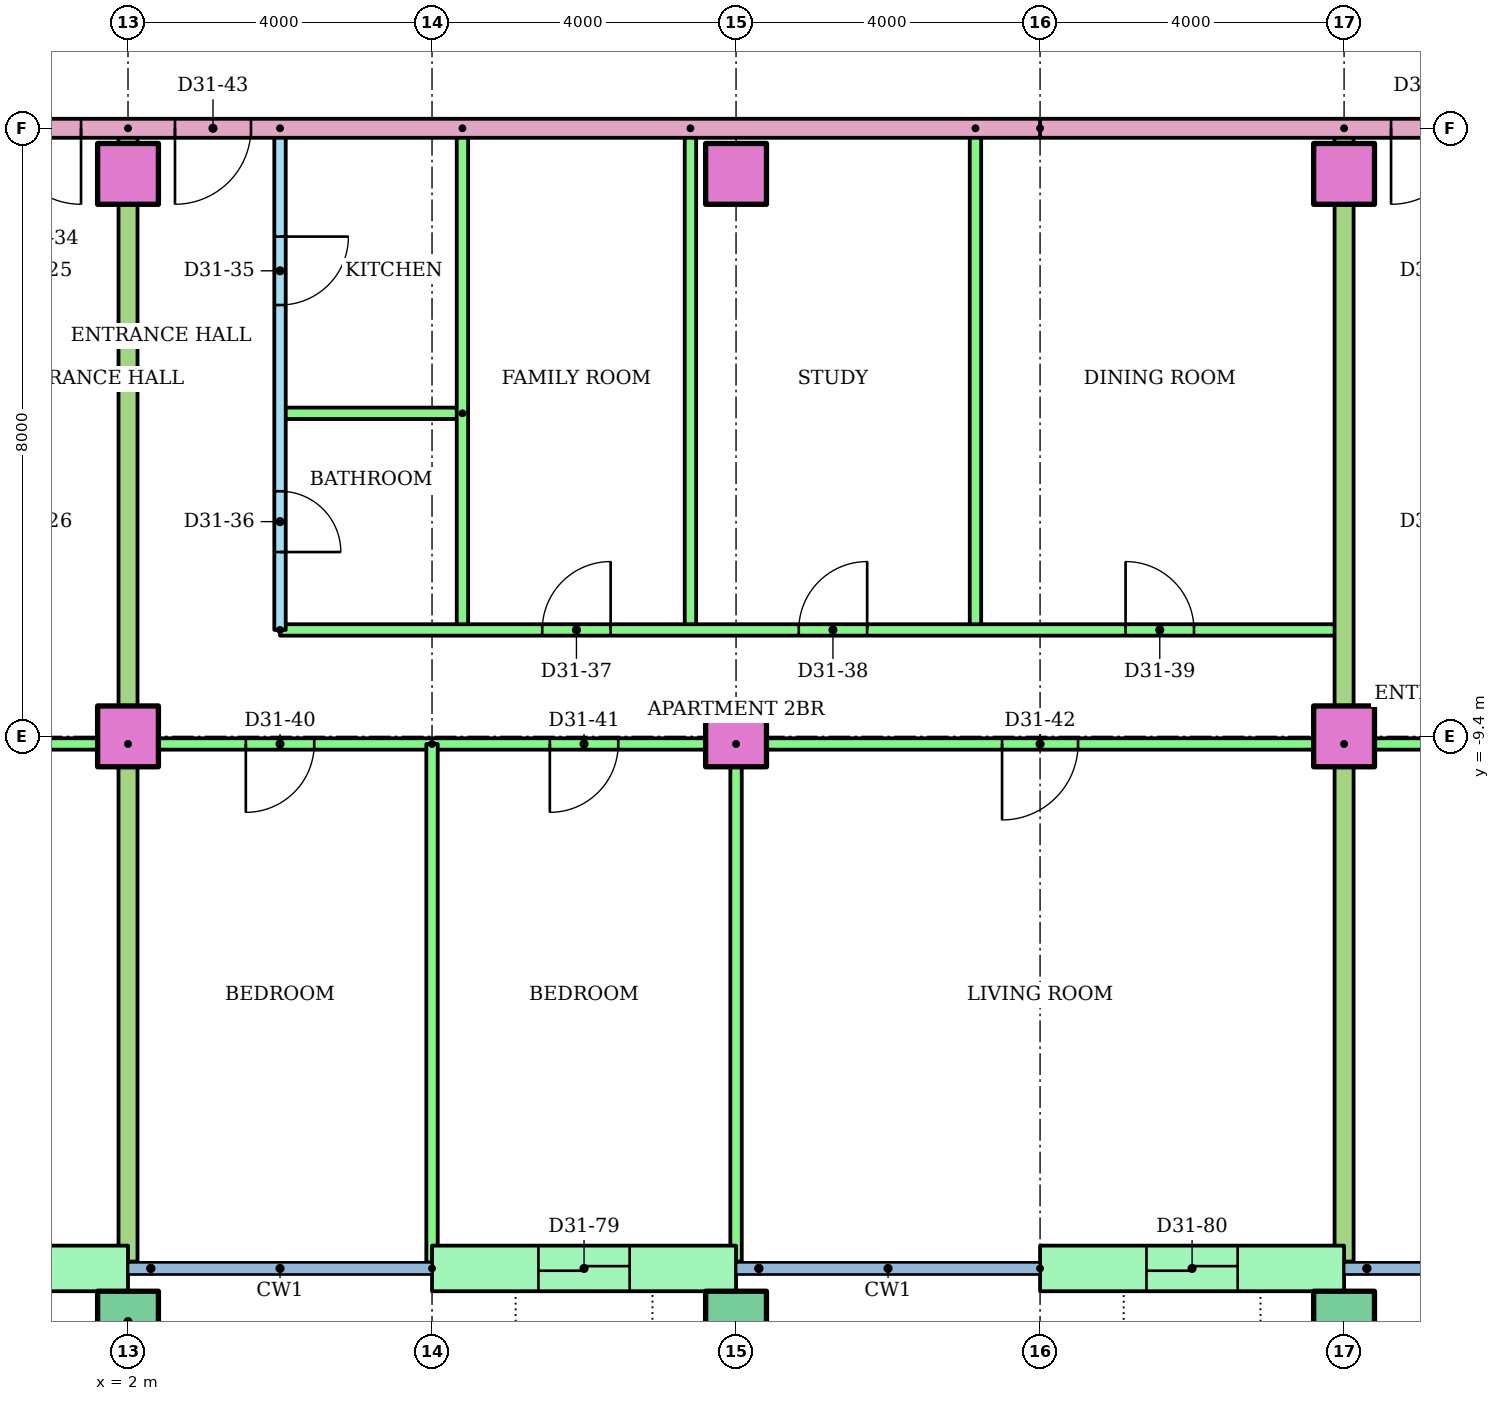
"""IFC4 building model, lengths in metres.
Left out: names, types, materials, properties, quantities, classifications, styles, units other than length and angle.
Written with IfcOpenShell. Run it as: python <this file> out.ifc"""

import sys

from ifc_helpers import new_model, si_unit, direction, frame, frame_2d, origin, origin_2d, place, context, subcontext, project, spatial, rectangle, hollow_rectangle, extrude, element, fill, save


model = new_model("IFC4")
c1 = context("Model", 3, precision=1e-05, world=origin(), true_north=direction((0.0, 1.0)))
c2 = subcontext(c1, "Body", "Model", "MODEL_VIEW")
j1 = project(units=[si_unit("LENGTHUNIT", "METRE"), si_unit("PLANEANGLEUNIT", "RADIAN")], contexts=[c1])
p1 = place(None, origin())
s1 = spatial("IfcSite", under=j1, at=p1, CompositionType="ELEMENT")
p2 = place(p1, origin())
s2 = spatial("IfcBuilding", under=s1, at=p2, CompositionType="ELEMENT")
p3 = place(p2, frame((0.0, 0.0, 123.0)))
s3 = spatial("IfcBuildingStorey", under=s2, at=p3, CompositionType="ELEMENT", Elevation=123.0)
for number, where in (
    (1, (2.0, -17.1, 0.0)),
    (2, (10.0, -17.1, 0.0)),
    (3, (18.0, -17.1, 0.0)),
):
    element("IfcColumn", number, at=place(p3, frame(where)), inside=s3, PredefinedType="COLUMN", context=c2, shape_type="SweptSolid", body=[
        extrude(hollow_rectangle(XDim=0.8, YDim=0.8, WallThickness=0.04, at=origin_2d()), origin(), (0.0, 0.0, 1.0), 3.2),
    ])
for number, where in (
    (4, (2.0, -9.4, 0.0)),
    (5, (10.0, -9.4, 0.0)),
    (6, (18.0, -9.4, 0.0)),
    (7, (2.0, -2.0, 0.0)),
    (8, (10.0, -2.0, 0.0)),
    (9, (18.0, -2.0, 0.0)),
):
    element("IfcColumn", number, at=place(p3, frame(where)), inside=s3, PredefinedType="COLUMN", context=c2, shape_type="SweptSolid", body=[
        extrude(rectangle(XDim=0.8, YDim=0.8, at=origin_2d()), origin(), (0.0, 0.0, 1.0), 3.2),
    ])
p4 = place(p3, frame((-2.0, -16.4, 0.0)))
e10 = element("IfcWall", 10, at=p4, inside=s3, PredefinedType="STANDARD", context=c2, shape_type="SweptSolid", body=[
    extrude(rectangle(XDim=4.0, YDim=0.6, at=frame_2d((2.0, 0.0))), origin(), (0.0, 0.0, 1.0), 2.92),
])
p5 = place(p4, frame((1.4, 0.0, 0.0)))
e11 = element("IfcOpeningElement", 11, at=p5, cuts=e10, PredefinedType="OPENING", context=c2, shape_type="SweptSolid", body=[
    extrude(rectangle(XDim=1.2, YDim=2.1, at=frame_2d((0.6, 1.05))), frame((0.0, 0.31, 0.0), z_axis=(0.0, -1.0, 0.0), x_axis=(1.0, 0.0, 0.0)), (0.0, 0.0, 1.0), 0.62),
])
p6 = place(p3, frame((6.0, -16.4, 0.0)))
e12 = element("IfcWall", 12, at=p6, inside=s3, PredefinedType="STANDARD", context=c2, shape_type="SweptSolid", body=[
    extrude(rectangle(XDim=4.0, YDim=0.6, at=frame_2d((2.0, 0.0))), origin(), (0.0, 0.0, 1.0), 2.92),
])
p7 = place(p6, frame((1.4, 0.0, 0.0)))
e13 = element("IfcOpeningElement", 13, at=p7, cuts=e12, PredefinedType="OPENING", context=c2, shape_type="SweptSolid", body=[
    extrude(rectangle(XDim=1.2, YDim=2.1, at=frame_2d((0.6, 1.05))), frame((0.0, 0.31, 0.0), z_axis=(0.0, -1.0, 0.0), x_axis=(1.0, 0.0, 0.0)), (0.0, 0.0, 1.0), 0.62),
])
p8 = place(p3, frame((14.0, -16.4, 0.0)))
e14 = element("IfcWall", 14, at=p8, inside=s3, PredefinedType="STANDARD", context=c2, shape_type="SweptSolid", body=[
    extrude(rectangle(XDim=4.0, YDim=0.6, at=frame_2d((2.0, 0.0))), origin(), (0.0, 0.0, 1.0), 2.92),
])
p9 = place(p8, frame((1.4, 0.0, 0.0)))
e15 = element("IfcOpeningElement", 15, at=p9, cuts=e14, PredefinedType="OPENING", context=c2, shape_type="SweptSolid", body=[
    extrude(rectangle(XDim=1.2, YDim=2.1, at=frame_2d((0.6, 1.05))), frame((0.0, 0.31, 0.0), z_axis=(0.0, -1.0, 0.0), x_axis=(1.0, 0.0, 0.0)), (0.0, 0.0, 1.0), 0.62),
])
p10 = place(p3, frame((2.0, -9.5, 0.0), z_axis=(0.0, 0.0, 1.0), x_axis=(-1.0, 0.0, 0.0)))
e16 = element("IfcWall", 16, at=p10, inside=s3, PredefinedType="PARTITIONING", context=c2, shape_type="SweptSolid", body=[
    extrude(rectangle(XDim=16.0, YDim=0.15, at=frame_2d((8.0, 0.0))), origin(), (0.0, 0.0, 1.0), 2.4),
])
p11 = place(p10, frame((13.55, 0.0, 0.0)))
e17 = element("IfcOpeningElement", 17, at=p11, cuts=e16, PredefinedType="OPENING", context=c2, shape_type="SweptSolid", body=[
    extrude(rectangle(XDim=0.9, YDim=2.1, at=frame_2d((0.45, 1.05))), frame((0.0, 0.085, 0.0), z_axis=(0.0, -1.0, 0.0), x_axis=(1.0, 0.0, 0.0)), (0.0, 0.0, 1.0), 0.17),
])
p12 = place(p10, frame((9.5, 0.0, 0.0)))
e18 = element("IfcOpeningElement", 18, at=p12, cuts=e16, PredefinedType="OPENING", context=c2, shape_type="SweptSolid", body=[
    extrude(rectangle(XDim=1.0, YDim=2.1, at=frame_2d((0.5, 1.05))), frame((0.0, 0.085, 0.0), z_axis=(0.0, -1.0, 0.0), x_axis=(1.0, 0.0, 0.0)), (0.0, 0.0, 1.0), 0.17),
])
p13 = place(p10, frame((5.55, 0.0, 0.0)))
e19 = element("IfcOpeningElement", 19, at=p13, cuts=e16, PredefinedType="OPENING", context=c2, shape_type="SweptSolid", body=[
    extrude(rectangle(XDim=0.9, YDim=2.1, at=frame_2d((0.45, 1.05))), frame((0.0, 0.085, 0.0), z_axis=(0.0, -1.0, 0.0), x_axis=(1.0, 0.0, 0.0)), (0.0, 0.0, 1.0), 0.17),
])
p14 = place(p10, frame((1.55, 0.0, 0.0)))
e20 = element("IfcOpeningElement", 20, at=p14, cuts=e16, PredefinedType="OPENING", context=c2, shape_type="SweptSolid", body=[
    extrude(rectangle(XDim=0.9, YDim=2.1, at=frame_2d((0.45, 1.05))), frame((0.0, 0.085, 0.0), z_axis=(0.0, -1.0, 0.0), x_axis=(1.0, 0.0, 0.0)), (0.0, 0.0, 1.0), 0.17),
])
p15 = place(p3, frame((4.0, -1.4, 0.0), z_axis=(0.0, 0.0, 1.0), x_axis=(0.0, -1.0, 0.0)))
e21 = element("IfcWall", 21, at=p15, inside=s3, PredefinedType="PARTITIONING", context=c2, shape_type="SweptSolid", body=[
    extrude(rectangle(XDim=6.6, YDim=0.15, at=frame_2d((3.3, 0.0))), origin(), (0.0, 0.0, 1.0), 2.4),
])
p16 = place(p15, frame((1.425, 0.0, 0.0)))
e22 = element("IfcOpeningElement", 22, at=p16, cuts=e21, PredefinedType="OPENING", context=c2, shape_type="SweptSolid", body=[
    extrude(rectangle(XDim=0.9, YDim=2.1, at=frame_2d((0.45, 1.05))), frame((0.0, 0.085, 0.0), z_axis=(0.0, -1.0, 0.0), x_axis=(1.0, 0.0, 0.0)), (0.0, 0.0, 1.0), 0.17),
])
p17 = place(p15, frame((4.775, 0.0, 0.0)))
e23 = element("IfcOpeningElement", 23, at=p17, cuts=e21, PredefinedType="OPENING", context=c2, shape_type="SweptSolid", body=[
    extrude(rectangle(XDim=0.8, YDim=2.1, at=frame_2d((0.4, 1.05))), frame((0.0, 0.085, 0.0), z_axis=(0.0, -1.0, 0.0), x_axis=(1.0, 0.0, 0.0)), (0.0, 0.0, 1.0), 0.17),
])
p18 = place(p3, frame((6.4, -5.15, 0.0), z_axis=(0.0, 0.0, 1.0), x_axis=(-1.0, 0.0, 0.0)))
e24 = element("IfcWall", 24, at=p18, inside=s3, PredefinedType="PARTITIONING", context=c2, shape_type="SweptSolid", body=[
    extrude(rectangle(XDim=2.4, YDim=0.15, at=frame_2d((1.2, 0.0))), origin(), (0.0, 0.0, 1.0), 2.4),
])
for number, where, z_axis, x_axis in (
    (25, (6.4, -1.4, 0.0), (0.0, 0.0, 1.0), (0.0, -1.0, 0.0)),
    (26, (9.4, -1.4, 0.0), (0.0, 0.0, 1.0), (0.0, -1.0, 0.0)),
    (27, (13.15, -1.4, 0.0), (0.0, 0.0, 1.0), (0.0, -1.0, 0.0)),
):
    element("IfcWall", number, at=place(p3, frame(where, z_axis=z_axis, x_axis=x_axis)), inside=s3, PredefinedType="PARTITIONING", context=c2, shape_type="SweptSolid", body=[
        extrude(rectangle(XDim=6.6, YDim=0.15, at=frame_2d((3.3, 0.0))), origin(), (0.0, 0.0, 1.0), 2.4),
    ])
p19 = place(p3, frame((4.0, -8.0, 0.0)))
e28 = element("IfcWall", 28, at=p19, inside=s3, PredefinedType="PARTITIONING", context=c2, shape_type="SweptSolid", body=[
    extrude(rectangle(XDim=14.0, YDim=0.15, at=frame_2d((7.0, 0.0))), origin(), (0.0, 0.0, 1.0), 2.4),
])
p20 = place(p19, frame((3.45, 0.0, 0.0)))
e29 = element("IfcOpeningElement", 29, at=p20, cuts=e28, PredefinedType="OPENING", context=c2, shape_type="SweptSolid", body=[
    extrude(rectangle(XDim=0.9, YDim=2.1, at=frame_2d((0.45, 1.05))), frame((0.0, 0.085, 0.0), z_axis=(0.0, -1.0, 0.0), x_axis=(1.0, 0.0, 0.0)), (0.0, 0.0, 1.0), 0.17),
])
p21 = place(p19, frame((6.825, 0.0, 0.0)))
e30 = element("IfcOpeningElement", 30, at=p21, cuts=e28, PredefinedType="OPENING", context=c2, shape_type="SweptSolid", body=[
    extrude(rectangle(XDim=0.9, YDim=2.1, at=frame_2d((0.45, 1.05))), frame((0.0, 0.085, 0.0), z_axis=(0.0, -1.0, 0.0), x_axis=(1.0, 0.0, 0.0)), (0.0, 0.0, 1.0), 0.17),
])
p22 = place(p19, frame((11.125, 0.0, 0.0)))
e31 = element("IfcOpeningElement", 31, at=p22, cuts=e28, PredefinedType="OPENING", context=c2, shape_type="SweptSolid", body=[
    extrude(rectangle(XDim=0.9, YDim=2.1, at=frame_2d((0.45, 1.05))), frame((0.0, 0.085, 0.0), z_axis=(0.0, -1.0, 0.0), x_axis=(1.0, 0.0, 0.0)), (0.0, 0.0, 1.0), 0.17),
])
p23 = place(p3, frame((18.0, -9.5, 0.0), z_axis=(0.0, 0.0, 1.0), x_axis=(-1.0, 0.0, 0.0)))
e32 = element("IfcWall", 32, at=p23, inside=s3, PredefinedType="PARTITIONING", context=c2, shape_type="SweptSolid", body=[
    extrude(rectangle(XDim=16.0, YDim=0.15, at=frame_2d((8.0, 0.0))), origin(), (0.0, 0.0, 1.0), 2.4),
])
p24 = place(p23, frame((13.55, 0.0, 0.0)))
e33 = element("IfcOpeningElement", 33, at=p24, cuts=e32, PredefinedType="OPENING", context=c2, shape_type="SweptSolid", body=[
    extrude(rectangle(XDim=0.9, YDim=2.1, at=frame_2d((0.45, 1.05))), frame((0.0, 0.085, 0.0), z_axis=(0.0, -1.0, 0.0), x_axis=(1.0, 0.0, 0.0)), (0.0, 0.0, 1.0), 0.17),
])
p25 = place(p23, frame((9.55, 0.0, 0.0)))
e34 = element("IfcOpeningElement", 34, at=p25, cuts=e32, PredefinedType="OPENING", context=c2, shape_type="SweptSolid", body=[
    extrude(rectangle(XDim=0.9, YDim=2.1, at=frame_2d((0.45, 1.05))), frame((0.0, 0.085, 0.0), z_axis=(0.0, -1.0, 0.0), x_axis=(1.0, 0.0, 0.0)), (0.0, 0.0, 1.0), 0.17),
])
p26 = place(p23, frame((3.5, 0.0, 0.0)))
e35 = element("IfcOpeningElement", 35, at=p26, cuts=e32, PredefinedType="OPENING", context=c2, shape_type="SweptSolid", body=[
    extrude(rectangle(XDim=1.0, YDim=2.1, at=frame_2d((0.5, 1.05))), frame((0.0, 0.085, 0.0), z_axis=(0.0, -1.0, 0.0), x_axis=(1.0, 0.0, 0.0)), (0.0, 0.0, 1.0), 0.17),
])
p27 = place(p3, frame((6.0, -9.5, 0.0), z_axis=(0.0, 0.0, 1.0), x_axis=(0.0, -1.0, 0.0)))
e36 = element("IfcWall", 36, at=p27, inside=s3, PredefinedType="PARTITIONING", context=c2, shape_type="SweptSolid", body=[
    extrude(rectangle(XDim=6.821, YDim=0.15, at=frame_2d((3.411, 0.0))), origin(), (0.0, 0.0, 1.0), 2.4),
])
p28 = place(p3, frame((10.0, -9.5, 0.0), z_axis=(0.0, 0.0, 1.0), x_axis=(0.0, -1.0, 0.0)))
e37 = element("IfcWall", 37, at=p28, inside=s3, PredefinedType="PARTITIONING", context=c2, shape_type="SweptSolid", body=[
    extrude(rectangle(XDim=6.81, YDim=0.15, at=frame_2d((3.405, 0.0))), origin(), (0.0, 0.0, 1.0), 2.4),
])
p29 = place(p3, frame((2.0, -1.4, 0.0), z_axis=(0.0, 0.0, 1.0), x_axis=(0.0, -1.0, 0.0)))
e38 = element("IfcWall", 38, at=p29, inside=s3, PredefinedType="PARTITIONING", context=c2, shape_type="SweptSolid", body=[
    extrude(rectangle(XDim=14.91, YDim=0.25, at=frame_2d((7.455, 0.0))), origin(), (0.0, 0.0, 1.0), 2.4),
])
p30 = place(p3, frame((32.72, -9.5, 0.0), z_axis=(0.0, 0.0, 1.0), x_axis=(-1.0, 0.0, 0.0)))
e39 = element("IfcWall", 39, at=p30, inside=s3, PredefinedType="PARTITIONING", context=c2, shape_type="SweptSolid", body=[
    extrude(rectangle(XDim=14.72, YDim=0.15, at=frame_2d((7.36, 0.0))), origin(), (0.0, 0.0, 1.0), 2.4),
])
p31 = place(p30, frame((10.22, 0.0, 0.0)))
e40 = element("IfcOpeningElement", 40, at=p31, cuts=e39, PredefinedType="OPENING", context=c2, shape_type="SweptSolid", body=[
    extrude(rectangle(XDim=1.0, YDim=2.1, at=frame_2d((0.5, 1.05))), frame((0.0, 0.085, 0.0), z_axis=(0.0, -1.0, 0.0), x_axis=(1.0, 0.0, 0.0)), (0.0, 0.0, 1.0), 0.17),
])
p32 = place(p30, frame((3.02, 0.0, 0.0)))
e41 = element("IfcOpeningElement", 41, at=p32, cuts=e39, PredefinedType="OPENING", context=c2, shape_type="SweptSolid", body=[
    extrude(rectangle(XDim=0.9, YDim=2.1, at=frame_2d((0.45, 1.05))), frame((0.0, 0.085, 0.0), z_axis=(0.0, -1.0, 0.0), x_axis=(1.0, 0.0, 0.0)), (0.0, 0.0, 1.0), 0.17),
])
p33 = place(p3, frame((18.0, -1.4, 0.0), z_axis=(0.0, 0.0, 1.0), x_axis=(0.0, -1.0, 0.0)))
e42 = element("IfcWall", 42, at=p33, inside=s3, PredefinedType="PARTITIONING", context=c2, shape_type="SweptSolid", body=[
    extrude(rectangle(XDim=14.91, YDim=0.25, at=frame_2d((7.455, 0.0))), origin(), (0.0, 0.0, 1.0), 2.4),
])
p34 = place(p3, frame((29.0, -1.4, 0.0), z_axis=(0.0, 0.0, 1.0), x_axis=(-1.0, 0.0, 0.0)))
e43 = element("IfcWall", 43, at=p34, inside=s3, PredefinedType="PARTITIONING", context=c2, shape_type="SweptSolid", body=[
    extrude(rectangle(XDim=15.0, YDim=0.25, at=frame_2d((7.5, 0.0))), origin(), (0.0, 0.0, 1.0), 2.4),
])
p35 = place(p34, frame((9.382, 0.0, 0.0)))
e44 = element("IfcOpeningElement", 44, at=p35, cuts=e43, PredefinedType="OPENING", context=c2, shape_type="SweptSolid", body=[
    extrude(rectangle(XDim=1.0, YDim=2.1, at=frame_2d((0.5, 1.05))), frame((0.0, 0.135, 0.0), z_axis=(0.0, -1.0, 0.0), x_axis=(1.0, 0.0, 0.0)), (0.0, 0.0, 1.0), 0.27),
])
p36 = place(p3, frame((14.0, -1.4, 0.0), z_axis=(0.0, 0.0, 1.0), x_axis=(-1.0, 0.0, 0.0)))
e45 = element("IfcWall", 45, at=p36, inside=s3, PredefinedType="PARTITIONING", context=c2, shape_type="SweptSolid", body=[
    extrude(rectangle(XDim=28.0, YDim=0.25, at=frame_2d((14.0, 0.0))), origin(), (0.0, 0.0, 1.0), 2.4),
])
p37 = place(p36, frame((12.618, 0.0, 0.0)))
e46 = element("IfcOpeningElement", 46, at=p37, cuts=e45, PredefinedType="OPENING", context=c2, shape_type="SweptSolid", body=[
    extrude(rectangle(XDim=1.0, YDim=2.1, at=frame_2d((0.5, 1.05))), frame((0.0, 0.135, 0.0), z_axis=(0.0, -1.0, 0.0), x_axis=(1.0, 0.0, 0.0)), (0.0, 0.0, 1.0), 0.27),
])
p38 = place(p36, frame((10.382, 0.0, 0.0)))
e47 = element("IfcOpeningElement", 47, at=p38, cuts=e45, PredefinedType="OPENING", context=c2, shape_type="SweptSolid", body=[
    extrude(rectangle(XDim=1.0, YDim=2.1, at=frame_2d((0.5, 1.05))), frame((0.0, 0.135, 0.0), z_axis=(0.0, -1.0, 0.0), x_axis=(1.0, 0.0, 0.0)), (0.0, 0.0, 1.0), 0.27),
])
p39 = place(p37, origin())
e48 = element("IfcDoor", 48, at=p39, inside=s3, OperationType="SINGLE_SWING_LEFT", PredefinedType="DOOR", context=c2, shape_type="SweptSolid", body=[
    extrude(rectangle(XDim=1.0, YDim=2.1, at=frame_2d((0.5, 1.05))), frame((0.0, 0.025, 0.0), z_axis=(0.0, -1.0, 0.0), x_axis=(1.0, 0.0, 0.0)), (0.0, 0.0, 1.0), 0.05),
])
fill(e46, e48)
p40 = place(p16, origin())
e49 = element("IfcDoor", 49, at=p40, inside=s3, OperationType="SINGLE_SWING_LEFT", PredefinedType="DOOR", context=c2, shape_type="SweptSolid", body=[
    extrude(rectangle(XDim=0.9, YDim=2.1, at=frame_2d((0.45, 1.05))), frame((0.0, 0.025, 0.0), z_axis=(0.0, -1.0, 0.0), x_axis=(1.0, 0.0, 0.0)), (0.0, 0.0, 1.0), 0.05),
])
fill(e22, e49)
p41 = place(p17, origin())
e50 = element("IfcDoor", 50, at=p41, inside=s3, OperationType="SINGLE_SWING_RIGHT", PredefinedType="DOOR", context=c2, shape_type="SweptSolid", body=[
    extrude(rectangle(XDim=0.8, YDim=2.1, at=frame_2d((0.4, 1.05))), frame((0.0, 0.025, 0.0), z_axis=(0.0, -1.0, 0.0), x_axis=(1.0, 0.0, 0.0)), (0.0, 0.0, 1.0), 0.05),
])
fill(e23, e50)
p42 = place(p20, origin())
e51 = element("IfcDoor", 51, at=p42, inside=s3, OperationType="SINGLE_SWING_RIGHT", PredefinedType="DOOR", context=c2, shape_type="SweptSolid", body=[
    extrude(rectangle(XDim=0.9, YDim=2.1, at=frame_2d((0.45, 1.05))), frame((0.0, 0.025, 0.0), z_axis=(0.0, -1.0, 0.0), x_axis=(1.0, 0.0, 0.0)), (0.0, 0.0, 1.0), 0.05),
])
fill(e29, e51)
p43 = place(p21, origin())
e52 = element("IfcDoor", 52, at=p43, inside=s3, OperationType="SINGLE_SWING_RIGHT", PredefinedType="DOOR", context=c2, shape_type="SweptSolid", body=[
    extrude(rectangle(XDim=0.9, YDim=2.1, at=frame_2d((0.45, 1.05))), frame((0.0, 0.025, 0.0), z_axis=(0.0, -1.0, 0.0), x_axis=(1.0, 0.0, 0.0)), (0.0, 0.0, 1.0), 0.05),
])
fill(e30, e52)
p44 = place(p22, origin())
e53 = element("IfcDoor", 53, at=p44, inside=s3, OperationType="SINGLE_SWING_LEFT", PredefinedType="DOOR", context=c2, shape_type="SweptSolid", body=[
    extrude(rectangle(XDim=0.9, YDim=2.1, at=frame_2d((0.45, 1.05))), frame((0.0, 0.025, 0.0), z_axis=(0.0, -1.0, 0.0), x_axis=(1.0, 0.0, 0.0)), (0.0, 0.0, 1.0), 0.05),
])
fill(e31, e53)
p45 = place(p24, origin())
e54 = element("IfcDoor", 54, at=p45, inside=s3, OperationType="SINGLE_SWING_RIGHT", PredefinedType="DOOR", context=c2, shape_type="SweptSolid", body=[
    extrude(rectangle(XDim=0.9, YDim=2.1, at=frame_2d((0.45, 1.05))), frame((0.0, 0.025, 0.0), z_axis=(0.0, -1.0, 0.0), x_axis=(1.0, 0.0, 0.0)), (0.0, 0.0, 1.0), 0.05),
])
fill(e33, e54)
p46 = place(p25, origin())
e55 = element("IfcDoor", 55, at=p46, inside=s3, OperationType="SINGLE_SWING_RIGHT", PredefinedType="DOOR", context=c2, shape_type="SweptSolid", body=[
    extrude(rectangle(XDim=0.9, YDim=2.1, at=frame_2d((0.45, 1.05))), frame((0.0, 0.025, 0.0), z_axis=(0.0, -1.0, 0.0), x_axis=(1.0, 0.0, 0.0)), (0.0, 0.0, 1.0), 0.05),
])
fill(e34, e55)
p47 = place(p26, origin())
e56 = element("IfcDoor", 56, at=p47, inside=s3, OperationType="SINGLE_SWING_RIGHT", PredefinedType="DOOR", context=c2, shape_type="SweptSolid", body=[
    extrude(rectangle(XDim=1.0, YDim=2.1, at=frame_2d((0.5, 1.05))), frame((0.0, 0.025, 0.0), z_axis=(0.0, -1.0, 0.0), x_axis=(1.0, 0.0, 0.0)), (0.0, 0.0, 1.0), 0.05),
])
fill(e35, e56)
p48 = place(p38, origin())
e57 = element("IfcDoor", 57, at=p48, inside=s3, OperationType="SINGLE_SWING_RIGHT", PredefinedType="DOOR", context=c2, shape_type="SweptSolid", body=[
    extrude(rectangle(XDim=1.0, YDim=2.1, at=frame_2d((0.5, 1.05))), frame((0.0, 0.025, 0.0), z_axis=(0.0, -1.0, 0.0), x_axis=(1.0, 0.0, 0.0)), (0.0, 0.0, 1.0), 0.05),
])
fill(e47, e57)
p49 = place(p35, origin())
e58 = element("IfcDoor", 58, at=p49, inside=s3, OperationType="SINGLE_SWING_RIGHT", PredefinedType="DOOR", context=c2, shape_type="SweptSolid", body=[
    extrude(rectangle(XDim=1.0, YDim=2.1, at=frame_2d((0.5, 1.05))), frame((0.0, 0.025, 0.0), z_axis=(0.0, -1.0, 0.0), x_axis=(1.0, 0.0, 0.0)), (0.0, 0.0, 1.0), 0.05),
])
fill(e44, e58)
p50 = place(p7, origin())
e59 = element("IfcDoor", 59, at=p50, inside=s3, OperationType="SLIDING_TO_LEFT", PredefinedType="DOOR", context=c2, shape_type="SweptSolid", body=[
    extrude(rectangle(XDim=1.2, YDim=2.1, at=frame_2d((0.6, 1.05))), frame((0.0, 0.025, 0.0), z_axis=(0.0, -1.0, 0.0), x_axis=(1.0, 0.0, 0.0)), (0.0, 0.0, 1.0), 0.05),
])
fill(e13, e59)
p51 = place(p9, origin())
e60 = element("IfcDoor", 60, at=p51, inside=s3, OperationType="SLIDING_TO_LEFT", PredefinedType="DOOR", context=c2, shape_type="SweptSolid", body=[
    extrude(rectangle(XDim=1.2, YDim=2.1, at=frame_2d((0.6, 1.05))), frame((0.0, 0.025, 0.0), z_axis=(0.0, -1.0, 0.0), x_axis=(1.0, 0.0, 0.0)), (0.0, 0.0, 1.0), 0.05),
])
fill(e15, e60)
save(model, sys.argv[1])
